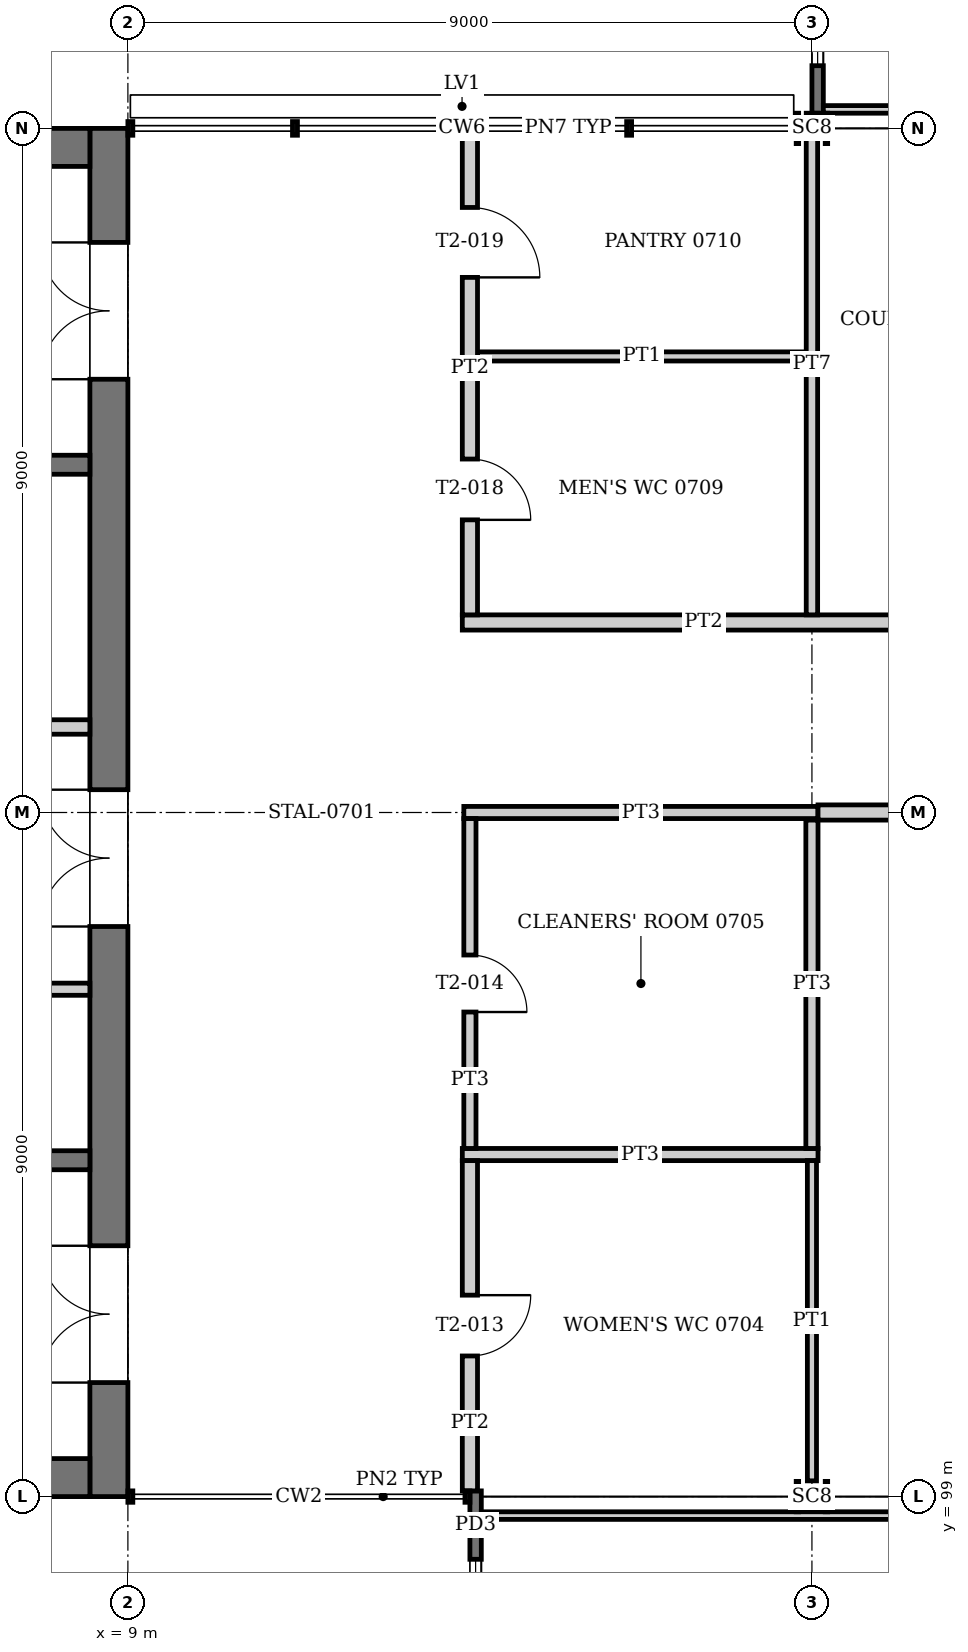
"""IFC4 building model, lengths in metres.
Left out: names, types, materials, properties, quantities, classifications, styles, units other than length and angle.
Written with IfcOpenShell. Run it as: python <this file> out.ifc"""

import sys

from ifc_helpers import new_model, si_unit, direction, frame, frame_2d, origin, origin_2d, place, context, subcontext, project, spatial, rectangle, i_section, extrude, element, fill, save


model = new_model("IFC4")
c1 = context("Model", 3, precision=1e-05, world=origin(), true_north=direction((0.0, 1.0)))
c2 = subcontext(c1, "Body", "Model", "MODEL_VIEW")
j1 = project(units=[si_unit("LENGTHUNIT", "METRE"), si_unit("PLANEANGLEUNIT", "RADIAN")], contexts=[c1])
p1 = place(None, origin())
s1 = spatial("IfcSite", under=j1, at=p1, CompositionType="ELEMENT")
p2 = place(p1, origin())
s2 = spatial("IfcBuilding", under=s1, at=p2, CompositionType="ELEMENT")
p3 = place(p2, frame((0.0, 0.0, 31.2)))
s3 = spatial("IfcBuildingStorey", under=s2, at=p3, CompositionType="ELEMENT", Elevation=31.2)
for number, where, z_axis, x_axis in (
    (1, (18.0, 99.0, 0.0), (0.0, 0.0, 1.0), (0.0, 1.0, 0.0)),
    (2, (18.0, 117.0, 0.0), (0.0, 0.0, 1.0), (0.0, 1.0, 0.0)),
):
    element("IfcColumn", number, at=place(p3, frame(where, z_axis=z_axis, x_axis=x_axis)), inside=s3, PredefinedType="COLUMN", context=c2, shape_type="SweptSolid", body=[
        extrude(i_section(OverallWidth=0.4, OverallDepth=0.414, WebThickness=0.025, FlangeThickness=0.032, at=origin_2d()), origin(), (0.0, 0.0, 1.0), 4.0),
    ])
p4 = place(p3, frame((8.75, 99.0, 0.0), z_axis=(0.0, 0.0, 1.0), x_axis=(0.0, 1.0, 0.0)))
e3 = element("IfcWall", 3, at=p4, inside=s3, PredefinedType="SHEAR", context=c2, shape_type="SweptSolid", body=[
    extrude(rectangle(XDim=18.0, YDim=0.5, at=frame_2d((9.0, 0.0))), origin(), (0.0, 0.0, 1.0), 4.0),
])
p5 = place(p4, frame((1.5, 0.0, 0.0)))
e4 = element("IfcOpeningElement", 4, at=p5, cuts=e3, PredefinedType="OPENING", context=c2, shape_type="SweptSolid", body=[
    extrude(rectangle(XDim=1.8, YDim=2.1, at=frame_2d((0.9, 1.05))), frame((0.0, 0.26, 0.0), z_axis=(0.0, -1.0, 0.0), x_axis=(1.0, 0.0, 0.0)), (0.0, 0.0, 1.0), 0.52),
])
p6 = place(p4, frame((14.7, 0.0, 0.0)))
e5 = element("IfcOpeningElement", 5, at=p6, cuts=e3, PredefinedType="OPENING", context=c2, shape_type="SweptSolid", body=[
    extrude(rectangle(XDim=1.8, YDim=2.1, at=frame_2d((0.9, 1.05))), frame((0.0, 0.26, 0.0), z_axis=(0.0, -1.0, 0.0), x_axis=(1.0, 0.0, 0.0)), (0.0, 0.0, 1.0), 0.52),
])
p7 = place(p4, frame((7.5, 0.0, 0.0)))
e6 = element("IfcOpeningElement", 6, at=p7, cuts=e3, PredefinedType="OPENING", context=c2, shape_type="SweptSolid", body=[
    extrude(rectangle(XDim=1.8, YDim=2.1, at=frame_2d((0.9, 1.05))), frame((0.0, 0.26, 0.0), z_axis=(0.0, -1.0, 0.0), x_axis=(1.0, 0.0, 0.0)), (0.0, 0.0, 1.0), 0.52),
])
for number, where, z_axis, x_axis in (
    (7, (0.5, 99.25, 0.0), (0.0, 0.0, 1.0), (1.0, 0.0, 0.0)),
    (8, (0.5, 116.75, 0.0), (0.0, 0.0, 1.0), (1.0, 0.0, 0.0)),
):
    element("IfcWall", number, at=place(p3, frame(where, z_axis=z_axis, x_axis=x_axis)), inside=s3, PredefinedType="SHEAR", context=c2, shape_type="SweptSolid", body=[
        extrude(rectangle(XDim=8.0, YDim=0.5, at=frame_2d((4.0, 0.0))), origin(), (0.0, 0.0, 1.0), 4.0),
    ])
p8 = place(p3, frame((13.575, 95.55, -0.15), z_axis=(0.0, 0.0, 1.0), x_axis=(0.0, 1.0, 0.0)))
e9 = element("IfcWall", 9, at=p8, inside=s3, PredefinedType="SOLIDWALL", context=c2, shape_type="SweptSolid", body=[
    extrude(rectangle(XDim=3.525, YDim=0.15, at=frame_2d((1.762, 0.0))), origin(), (0.0, 0.0, 1.0), 2.75),
])
p9 = place(p8, frame((0.625, 0.0, 1.05)))
e10 = element("IfcOpeningElement", 10, at=p9, cuts=e9, PredefinedType="OPENING", context=c2, shape_type="SweptSolid", body=[
    extrude(rectangle(XDim=2.0, YDim=1.4, at=frame_2d((1.0, 0.7))), frame((0.0, 0.085, 0.0), z_axis=(0.0, -1.0, 0.0), x_axis=(1.0, 0.0, 0.0)), (0.0, 0.0, 1.0), 0.17),
])
p10 = place(p3, frame((13.65, 98.75, 0.0), z_axis=(0.0, 0.0, 1.0), x_axis=(1.0, 0.0, 0.0)))
e11 = element("IfcWall", 11, at=p10, inside=s3, PredefinedType="PARTITIONING", context=c2, shape_type="SweptSolid", body=[
    extrude(rectangle(XDim=17.7, YDim=0.1, at=frame_2d((8.85, 0.0))), origin(), (0.0, 0.0, 1.0), 2.6),
])
p11 = place(p10, frame((8.35, 0.0, 0.0)))
e12 = element("IfcOpeningElement", 12, at=p11, cuts=e11, PredefinedType="OPENING", context=c2, shape_type="SweptSolid", body=[
    extrude(rectangle(XDim=0.9, YDim=2.1, at=frame_2d((0.45, 1.05))), frame((0.0, 0.06, 0.0), z_axis=(0.0, -1.0, 0.0), x_axis=(1.0, 0.0, 0.0)), (0.0, 0.0, 1.0), 0.12),
])
p12 = place(p3, frame((18.075, 120.45, -0.15), z_axis=(0.0, 0.0, 1.0), x_axis=(0.0, -1.0, 0.0)))
e13 = element("IfcWall", 13, at=p12, inside=s3, PredefinedType="SOLIDWALL", context=c2, shape_type="SweptSolid", body=[
    extrude(rectangle(XDim=3.25, YDim=0.15, at=frame_2d((1.625, 0.0))), origin(), (0.0, 0.0, 1.0), 2.75),
])
p13 = place(p12, frame((0.625, 0.0, 1.05)))
e14 = element("IfcOpeningElement", 14, at=p13, cuts=e13, PredefinedType="OPENING", context=c2, shape_type="SweptSolid", body=[
    extrude(rectangle(XDim=2.0, YDim=1.4, at=frame_2d((1.0, 0.7))), frame((0.0, 0.085, 0.0), z_axis=(0.0, -1.0, 0.0), x_axis=(1.0, 0.0, 0.0)), (0.0, 0.0, 1.0), 0.17),
])
p14 = place(p3, frame((18.15, 117.25, 0.0), z_axis=(0.0, 0.0, 1.0), x_axis=(1.0, 0.0, 0.0)))
e15 = element("IfcWall", 15, at=p14, inside=s3, PredefinedType="PARTITIONING", context=c2, shape_type="SweptSolid", body=[
    extrude(rectangle(XDim=4.2, YDim=0.1, at=frame_2d((2.1, 0.0))), origin(), (0.0, 0.0, 1.0), 2.6),
])
p15 = place(p14, frame((1.6, 0.0, 0.0)))
e16 = element("IfcOpeningElement", 16, at=p15, cuts=e15, PredefinedType="OPENING", context=c2, shape_type="SweptSolid", body=[
    extrude(rectangle(XDim=0.9, YDim=2.1, at=frame_2d((0.45, 1.05))), frame((0.0, 0.06, 0.0), z_axis=(0.0, -1.0, 0.0), x_axis=(1.0, 0.0, 0.0)), (0.0, 0.0, 1.0), 0.12),
])
for number, where, z_axis, x_axis in (
    (17, (8.5, 103.425, 0.0), (0.0, 0.0, 1.0), (-1.0, 0.0, 0.0)),
    (18, (8.5, 112.575, 0.0), (0.0, 0.0, 1.0), (-1.0, 0.0, 0.0)),
):
    element("IfcWall", number, at=place(p3, frame(where, z_axis=z_axis, x_axis=x_axis)), inside=s3, PredefinedType="SOLIDWALL", context=c2, shape_type="SweptSolid", body=[
        extrude(rectangle(XDim=8.0, YDim=0.25, at=frame_2d((4.0, 0.0))), origin(), (0.0, 0.0, 1.0), 3.75),
    ])
p16 = place(p3, frame((8.5, 105.675, 0.0), z_axis=(0.0, 0.0, 1.0), x_axis=(-1.0, 0.0, 0.0)))
e19 = element("IfcWall", 19, at=p16, inside=s3, PredefinedType="PARTITIONING", context=c2, shape_type="SweptSolid", body=[
    extrude(rectangle(XDim=2.6, YDim=0.16, at=frame_2d((1.3, 0.0))), origin(), (0.0, 0.0, 1.0), 3.75),
])
p17 = place(p16, frame((0.7, 0.0, 0.0)))
e20 = element("IfcOpeningElement", 20, at=p17, cuts=e19, PredefinedType="OPENING", context=c2, shape_type="SweptSolid", body=[
    extrude(rectangle(XDim=1.2, YDim=2.1, at=frame_2d((0.6, 1.05))), frame((0.0, 0.09, 0.0), z_axis=(0.0, -1.0, 0.0), x_axis=(1.0, 0.0, 0.0)), (0.0, 0.0, 1.0), 0.18),
])
p18 = place(p3, frame((8.5, 109.125, 0.0), z_axis=(0.0, 0.0, 1.0), x_axis=(-1.0, 0.0, 0.0)))
e21 = element("IfcWall", 21, at=p18, inside=s3, PredefinedType="PARTITIONING", context=c2, shape_type="SweptSolid", body=[
    extrude(rectangle(XDim=2.6, YDim=0.19, at=frame_2d((1.3, 0.0))), origin(), (0.0, 0.0, 1.0), 3.75),
])
p19 = place(p18, frame((0.84, 0.0, 0.0)))
e22 = element("IfcOpeningElement", 22, at=p19, cuts=e21, PredefinedType="OPENING", context=c2, shape_type="SweptSolid", body=[
    extrude(rectangle(XDim=0.92, YDim=2.1, at=frame_2d((0.46, 1.05))), frame((0.0, 0.105, 0.0), z_axis=(0.0, -1.0, 0.0), x_axis=(1.0, 0.0, 0.0)), (0.0, 0.0, 1.0), 0.21),
])
p20 = place(p3, frame((13.4, 103.5, 0.0), z_axis=(0.0, 0.0, 1.0), x_axis=(1.0, 0.0, 0.0)))
e23 = element("IfcWall", 23, at=p20, inside=s3, PredefinedType="PARTITIONING", context=c2, shape_type="SweptSolid", body=[
    extrude(rectangle(XDim=4.68, YDim=0.16, at=frame_2d((2.34, 0.0))), origin(), (0.0, 0.0, 1.0), 3.05),
])
p21 = place(p3, frame((13.42, 108.0, 0.0), z_axis=(0.0, 0.0, 1.0), x_axis=(1.0, 0.0, 0.0)))
e24 = element("IfcWall", 24, at=p21, inside=s3, PredefinedType="PARTITIONING", context=c2, shape_type="SweptSolid", body=[
    extrude(rectangle(XDim=4.66, YDim=0.16, at=frame_2d((2.33, 0.0))), origin(), (0.0, 0.0, 1.0), 3.05),
])
p22 = place(p3, frame((18.08, 108.0, 0.0), z_axis=(0.0, 0.0, 1.0), x_axis=(1.0, 0.0, 0.0)))
e25 = element("IfcWall", 25, at=p22, inside=s3, PredefinedType="PARTITIONING", context=c2, shape_type="SweptSolid", body=[
    extrude(rectangle(XDim=22.52, YDim=0.2, at=frame_2d((11.26, 0.0))), origin(), (0.0, 0.0, 1.0), 3.05),
])
p23 = place(p22, frame((5.77, 0.0, 0.0)))
e26 = element("IfcOpeningElement", 26, at=p23, cuts=e25, PredefinedType="OPENING", context=c2, shape_type="SweptSolid", body=[
    extrude(rectangle(XDim=1.8, YDim=2.1, at=frame_2d((0.9, 1.05))), frame((0.0, 0.11, 0.0), z_axis=(0.0, -1.0, 0.0), x_axis=(1.0, 0.0, 0.0)), (0.0, 0.0, 1.0), 0.22),
])
p24 = place(p22, frame((15.17, 0.0, 0.0)))
e27 = element("IfcOpeningElement", 27, at=p24, cuts=e25, PredefinedType="OPENING", context=c2, shape_type="SweptSolid", body=[
    extrude(rectangle(XDim=1.0, YDim=2.1, at=frame_2d((0.5, 1.05))), frame((0.0, 0.11, 0.0), z_axis=(0.0, -1.0, 0.0), x_axis=(1.0, 0.0, 0.0)), (0.0, 0.0, 1.0), 0.22),
])
p25 = place(p22, frame((19.67, 0.0, 0.0)))
e28 = element("IfcOpeningElement", 28, at=p25, cuts=e25, PredefinedType="OPENING", context=c2, shape_type="SweptSolid", body=[
    extrude(rectangle(XDim=1.0, YDim=2.1, at=frame_2d((0.5, 1.05))), frame((0.0, 0.11, 0.0), z_axis=(0.0, -1.0, 0.0), x_axis=(1.0, 0.0, 0.0)), (0.0, 0.0, 1.0), 0.22),
])
p26 = place(p3, frame((13.4, 110.5, 0.0), z_axis=(0.0, 0.0, 1.0), x_axis=(1.0, 0.0, 0.0)))
e29 = element("IfcWall", 29, at=p26, inside=s3, PredefinedType="PARTITIONING", context=c2, shape_type="SweptSolid", body=[
    extrude(rectangle(XDim=27.2, YDim=0.2, at=frame_2d((13.6, 0.0))), origin(), (0.0, 0.0, 1.0), 3.05),
])
p27 = place(p26, frame((6.35, 0.0, 0.0)))
e30 = element("IfcOpeningElement", 30, at=p27, cuts=e29, PredefinedType="OPENING", context=c2, shape_type="SweptSolid", body=[
    extrude(rectangle(XDim=1.0, YDim=2.1, at=frame_2d((0.5, 1.05))), frame((0.0, 0.11, 0.0), z_axis=(0.0, -1.0, 0.0), x_axis=(1.0, 0.0, 0.0)), (0.0, 0.0, 1.0), 0.22),
])
p28 = place(p26, frame((10.85, 0.0, 0.0)))
e31 = element("IfcOpeningElement", 31, at=p28, cuts=e29, PredefinedType="OPENING", context=c2, shape_type="SweptSolid", body=[
    extrude(rectangle(XDim=1.0, YDim=2.1, at=frame_2d((0.5, 1.05))), frame((0.0, 0.11, 0.0), z_axis=(0.0, -1.0, 0.0), x_axis=(1.0, 0.0, 0.0)), (0.0, 0.0, 1.0), 0.22),
])
p29 = place(p26, frame((15.35, 0.0, 0.0)))
e32 = element("IfcOpeningElement", 32, at=p29, cuts=e29, PredefinedType="OPENING", context=c2, shape_type="SweptSolid", body=[
    extrude(rectangle(XDim=1.0, YDim=2.1, at=frame_2d((0.5, 1.05))), frame((0.0, 0.11, 0.0), z_axis=(0.0, -1.0, 0.0), x_axis=(1.0, 0.0, 0.0)), (0.0, 0.0, 1.0), 0.22),
])
p30 = place(p26, frame((19.85, 0.0, 0.0)))
e33 = element("IfcOpeningElement", 33, at=p30, cuts=e29, PredefinedType="OPENING", context=c2, shape_type="SweptSolid", body=[
    extrude(rectangle(XDim=1.0, YDim=2.1, at=frame_2d((0.5, 1.05))), frame((0.0, 0.11, 0.0), z_axis=(0.0, -1.0, 0.0), x_axis=(1.0, 0.0, 0.0)), (0.0, 0.0, 1.0), 0.22),
])
p31 = place(p26, frame((24.35, 0.0, 0.0)))
e34 = element("IfcOpeningElement", 34, at=p31, cuts=e29, PredefinedType="OPENING", context=c2, shape_type="SweptSolid", body=[
    extrude(rectangle(XDim=1.0, YDim=2.1, at=frame_2d((0.5, 1.05))), frame((0.0, 0.11, 0.0), z_axis=(0.0, -1.0, 0.0), x_axis=(1.0, 0.0, 0.0)), (0.0, 0.0, 1.0), 0.22),
])
p32 = place(p3, frame((13.6, 114.0, 0.0), z_axis=(0.0, 0.0, 1.0), x_axis=(1.0, 0.0, 0.0)))
e35 = element("IfcWall", 35, at=p32, inside=s3, PredefinedType="PARTITIONING", context=c2, shape_type="SweptSolid", body=[
    extrude(rectangle(XDim=4.325, YDim=0.12, at=frame_2d((2.163, 0.0))), origin(), (0.0, 0.0, 1.0), 3.05),
])
p33 = place(p3, frame((13.5, 99.075, 0.0), z_axis=(0.0, 0.0, 1.0), x_axis=(0.0, 1.0, 0.0)))
e36 = element("IfcWall", 36, at=p33, inside=s3, PredefinedType="PARTITIONING", context=c2, shape_type="SweptSolid", body=[
    extrude(rectangle(XDim=4.345, YDim=0.2, at=frame_2d((2.172, 0.0))), origin(), (0.0, 0.0, 1.0), 3.05),
])
p34 = place(p33, frame((1.775, 0.0, 0.0)))
e37 = element("IfcOpeningElement", 37, at=p34, cuts=e36, PredefinedType="OPENING", context=c2, shape_type="SweptSolid", body=[
    extrude(rectangle(XDim=0.8, YDim=2.1, at=frame_2d((0.4, 1.05))), frame((0.0, 0.11, 0.0), z_axis=(0.0, -1.0, 0.0), x_axis=(1.0, 0.0, 0.0)), (0.0, 0.0, 1.0), 0.22),
])
p35 = place(p3, frame((13.5, 103.58, 0.0), z_axis=(0.0, 0.0, 1.0), x_axis=(0.0, 1.0, 0.0)))
e38 = element("IfcWall", 38, at=p35, inside=s3, PredefinedType="PARTITIONING", context=c2, shape_type="SweptSolid", body=[
    extrude(rectangle(XDim=4.34, YDim=0.16, at=frame_2d((2.17, 0.0))), origin(), (0.0, 0.0, 1.0), 3.05),
])
p36 = place(p35, frame((1.795, 0.0, 0.0)))
e39 = element("IfcOpeningElement", 39, at=p36, cuts=e38, PredefinedType="OPENING", context=c2, shape_type="SweptSolid", body=[
    extrude(rectangle(XDim=0.75, YDim=2.1, at=frame_2d((0.375, 1.05))), frame((0.0, 0.09, 0.0), z_axis=(0.0, -1.0, 0.0), x_axis=(1.0, 0.0, 0.0)), (0.0, 0.0, 1.0), 0.18),
])
p37 = place(p3, frame((13.5, 110.6, 0.0), z_axis=(0.0, 0.0, 1.0), x_axis=(0.0, 1.0, 0.0)))
e40 = element("IfcWall", 40, at=p37, inside=s3, PredefinedType="PARTITIONING", context=c2, shape_type="SweptSolid", body=[
    extrude(rectangle(XDim=6.31, YDim=0.2, at=frame_2d((3.155, 0.0))), origin(), (0.0, 0.0, 1.0), 3.05),
])
p38 = place(p37, frame((1.25, 0.0, 0.0)))
e41 = element("IfcOpeningElement", 41, at=p38, cuts=e40, PredefinedType="OPENING", context=c2, shape_type="SweptSolid", body=[
    extrude(rectangle(XDim=0.8, YDim=2.1, at=frame_2d((0.4, 1.05))), frame((0.0, 0.11, 0.0), z_axis=(0.0, -1.0, 0.0), x_axis=(1.0, 0.0, 0.0)), (0.0, 0.0, 1.0), 0.22),
])
p39 = place(p37, frame((4.44, 0.0, 0.0)))
e42 = element("IfcOpeningElement", 42, at=p39, cuts=e40, PredefinedType="OPENING", context=c2, shape_type="SweptSolid", body=[
    extrude(rectangle(XDim=0.92, YDim=2.1, at=frame_2d((0.46, 1.05))), frame((0.0, 0.11, 0.0), z_axis=(0.0, -1.0, 0.0), x_axis=(1.0, 0.0, 0.0)), (0.0, 0.0, 1.0), 0.22),
])
p40 = place(p3, frame((18.0, 99.207, 0.0), z_axis=(0.0, 0.0, 1.0), x_axis=(0.0, 1.0, 0.0)))
e43 = element("IfcWall", 43, at=p40, inside=s3, PredefinedType="PARTITIONING", context=c2, shape_type="SweptSolid", body=[
    extrude(rectangle(XDim=4.213, YDim=0.12, at=frame_2d((2.106, 0.0))), origin(), (0.0, 0.0, 1.0), 3.05),
])
p41 = place(p3, frame((18.0, 103.58, 0.0), z_axis=(0.0, 0.0, 1.0), x_axis=(0.0, 1.0, 0.0)))
e44 = element("IfcWall", 44, at=p41, inside=s3, PredefinedType="PARTITIONING", context=c2, shape_type="SweptSolid", body=[
    extrude(rectangle(XDim=4.32, YDim=0.16, at=frame_2d((2.16, 0.0))), origin(), (0.0, 0.0, 1.0), 3.05),
])
p42 = place(p3, frame((18.0, 110.6, 0.0), z_axis=(0.0, 0.0, 1.0), x_axis=(0.0, 1.0, 0.0)))
e45 = element("IfcWall", 45, at=p42, inside=s3, PredefinedType="PARTITIONING", context=c2, shape_type="SweptSolid", body=[
    extrude(rectangle(XDim=6.6, YDim=0.15, at=frame_2d((3.3, 0.0))), origin(), (0.0, 0.0, 1.0), 3.05),
])
p43 = place(p9, origin())
e46 = element("IfcWindow", 46, at=p43, inside=s3, PartitioningType="SINGLE_PANEL", PredefinedType="WINDOW", context=c2, shape_type="SweptSolid", body=[
    extrude(rectangle(XDim=2.0, YDim=1.4, at=frame_2d((1.0, 0.7))), frame((0.0, 0.03, 0.0), z_axis=(0.0, -1.0, 0.0), x_axis=(1.0, 0.0, 0.0)), (0.0, 0.0, 1.0), 0.06),
])
fill(e10, e46)
p44 = place(p13, origin())
e47 = element("IfcWindow", 47, at=p44, inside=s3, PartitioningType="SINGLE_PANEL", PredefinedType="WINDOW", context=c2, shape_type="SweptSolid", body=[
    extrude(rectangle(XDim=2.0, YDim=1.4, at=frame_2d((1.0, 0.7))), frame((0.0, 0.03, 0.0), z_axis=(0.0, -1.0, 0.0), x_axis=(1.0, 0.0, 0.0)), (0.0, 0.0, 1.0), 0.06),
])
fill(e14, e47)
p45 = place(p34, frame((0.8, 0.0, 0.0), z_axis=(0.0, 0.0, 1.0), x_axis=(-1.0, 0.0, 0.0)))
e48 = element("IfcDoor", 48, at=p45, inside=s3, OperationType="SINGLE_SWING_LEFT", PredefinedType="DOOR", context=c2, shape_type="SweptSolid", body=[
    extrude(rectangle(XDim=0.8, YDim=2.1, at=frame_2d((0.4, 1.05))), frame((0.0, 0.025, 0.0), z_axis=(0.0, -1.0, 0.0), x_axis=(1.0, 0.0, 0.0)), (0.0, 0.0, 1.0), 0.05),
])
fill(e37, e48)
p46 = place(p36, frame((0.75, 0.0, 0.0), z_axis=(0.0, 0.0, 1.0), x_axis=(-1.0, 0.0, 0.0)))
e49 = element("IfcDoor", 49, at=p46, inside=s3, OperationType="SINGLE_SWING_RIGHT", PredefinedType="DOOR", context=c2, shape_type="SweptSolid", body=[
    extrude(rectangle(XDim=0.75, YDim=2.1, at=frame_2d((0.375, 1.05))), frame((0.0, 0.025, 0.0), z_axis=(0.0, -1.0, 0.0), x_axis=(1.0, 0.0, 0.0)), (0.0, 0.0, 1.0), 0.05),
])
fill(e39, e49)
p47 = place(p38, frame((0.8, 0.0, 0.0), z_axis=(0.0, 0.0, 1.0), x_axis=(-1.0, 0.0, 0.0)))
e50 = element("IfcDoor", 50, at=p47, inside=s3, OperationType="SINGLE_SWING_RIGHT", PredefinedType="DOOR", context=c2, shape_type="SweptSolid", body=[
    extrude(rectangle(XDim=0.8, YDim=2.1, at=frame_2d((0.4, 1.05))), frame((0.0, 0.025, 0.0), z_axis=(0.0, -1.0, 0.0), x_axis=(1.0, 0.0, 0.0)), (0.0, 0.0, 1.0), 0.05),
])
fill(e41, e50)
p48 = place(p39, frame((0.92, 0.0, 0.0), z_axis=(0.0, 0.0, 1.0), x_axis=(-1.0, 0.0, 0.0)))
e51 = element("IfcDoor", 51, at=p48, inside=s3, OperationType="SINGLE_SWING_RIGHT", PredefinedType="DOOR", context=c2, shape_type="SweptSolid", body=[
    extrude(rectangle(XDim=0.92, YDim=2.1, at=frame_2d((0.46, 1.05))), frame((0.0, 0.025, 0.0), z_axis=(0.0, -1.0, 0.0), x_axis=(1.0, 0.0, 0.0)), (0.0, 0.0, 1.0), 0.05),
])
fill(e42, e51)
p49 = place(p5, origin())
e52 = element("IfcDoor", 52, at=p49, inside=s3, OperationType="DOUBLE_DOOR_SINGLE_SWING", PredefinedType="DOOR", context=c2, shape_type="SweptSolid", body=[
    extrude(rectangle(XDim=1.8, YDim=2.1, at=frame_2d((0.9, 1.05))), frame((0.0, 0.025, 0.0), z_axis=(0.0, -1.0, 0.0), x_axis=(1.0, 0.0, 0.0)), (0.0, 0.0, 1.0), 0.05),
])
fill(e4, e52)
p50 = place(p6, origin())
e53 = element("IfcDoor", 53, at=p50, inside=s3, OperationType="DOUBLE_DOOR_SINGLE_SWING", PredefinedType="DOOR", context=c2, shape_type="SweptSolid", body=[
    extrude(rectangle(XDim=1.8, YDim=2.1, at=frame_2d((0.9, 1.05))), frame((0.0, 0.025, 0.0), z_axis=(0.0, -1.0, 0.0), x_axis=(1.0, 0.0, 0.0)), (0.0, 0.0, 1.0), 0.05),
])
fill(e5, e53)
p51 = place(p7, origin())
e54 = element("IfcDoor", 54, at=p51, inside=s3, OperationType="DOUBLE_DOOR_SINGLE_SWING", PredefinedType="DOOR", context=c2, shape_type="SweptSolid", body=[
    extrude(rectangle(XDim=1.8, YDim=2.1, at=frame_2d((0.9, 1.05))), frame((0.0, 0.025, 0.0), z_axis=(0.0, -1.0, 0.0), x_axis=(1.0, 0.0, 0.0)), (0.0, 0.0, 1.0), 0.05),
])
fill(e6, e54)
save(model, sys.argv[1])
